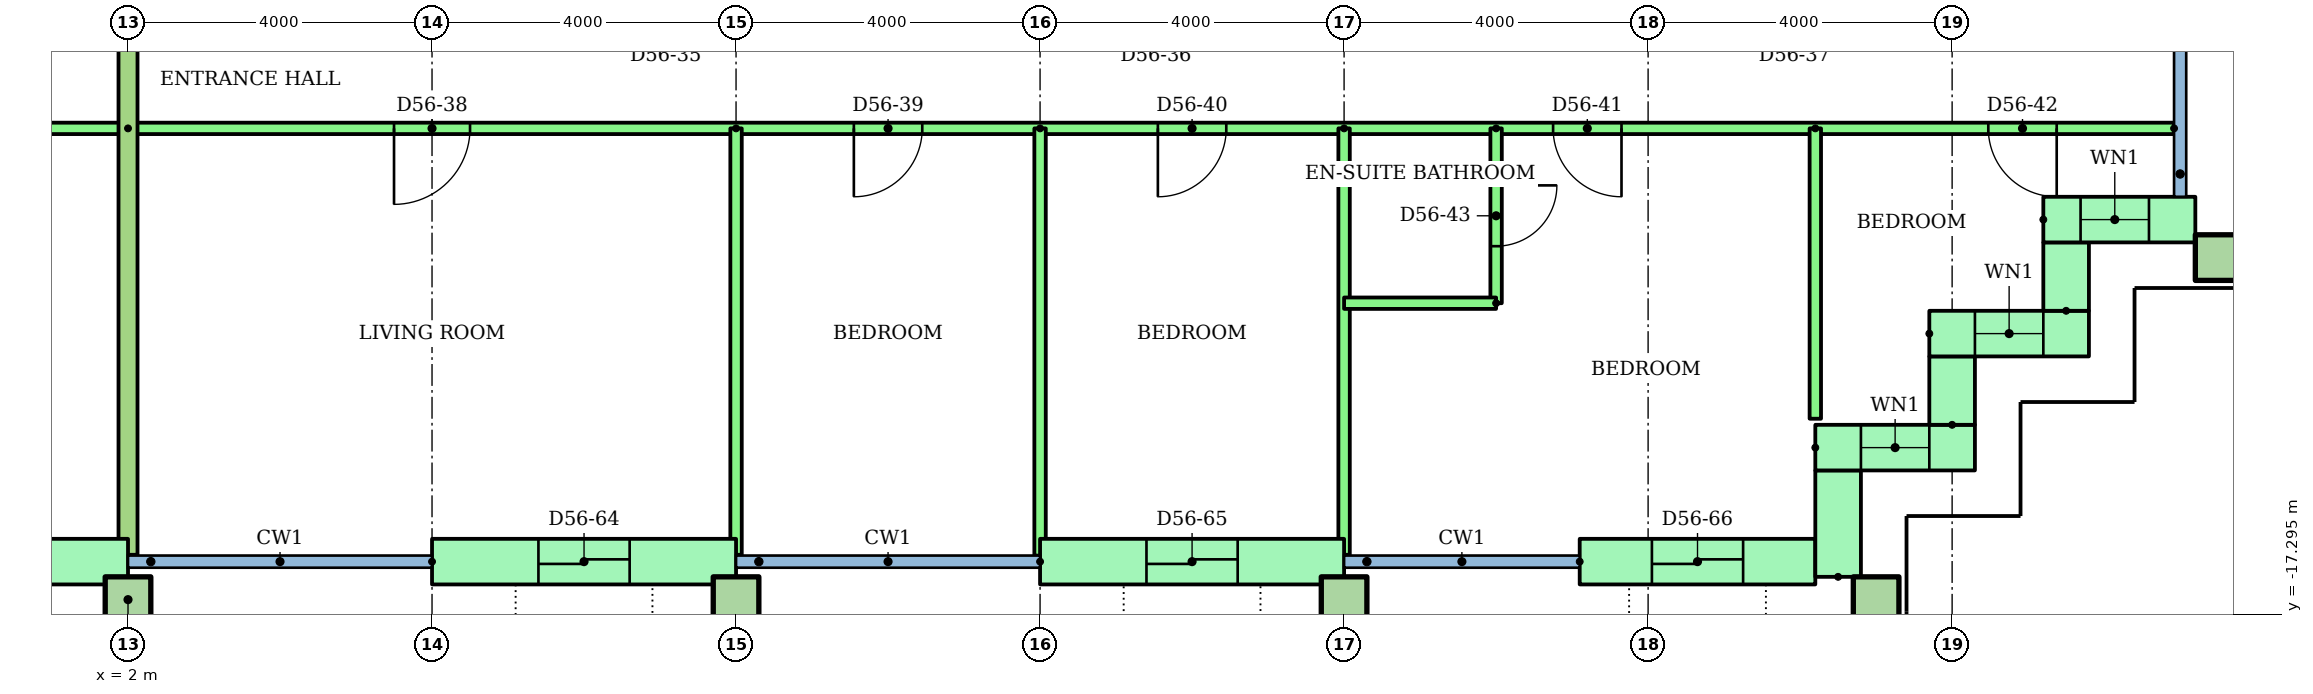
"""IFC4 building model, lengths in metres.
Left out: names, types, materials, properties, quantities, classifications, styles, units other than length and angle.
Written with IfcOpenShell. Run it as: python <this file> out.ifc"""

import sys

from ifc_helpers import new_model, si_unit, direction, frame, frame_2d, origin, origin_2d, place, context, subcontext, project, spatial, rectangle, hollow_rectangle, extrude, element, fill, save


model = new_model("IFC4")
c1 = context("Model", 3, precision=1e-05, world=origin(), true_north=direction((0.0, 1.0)))
c2 = subcontext(c1, "Body", "Model", "MODEL_VIEW")
j1 = project(units=[si_unit("LENGTHUNIT", "METRE"), si_unit("PLANEANGLEUNIT", "RADIAN")], contexts=[c1])
p1 = place(None, origin())
s1 = spatial("IfcSite", under=j1, at=p1, CompositionType="ELEMENT")
p2 = place(p1, origin())
s2 = spatial("IfcBuilding", under=s1, at=p2, CompositionType="ELEMENT")
p3 = place(p2, frame((0.0, 0.0, 217.2)))
s3 = spatial("IfcBuildingStorey", under=s2, at=p3, CompositionType="ELEMENT", Elevation=217.2)
for number, where in (
    (1, (2.0, -17.1, 0.0)),
    (2, (10.0, -17.1, 0.0)),
    (3, (18.0, -17.1, 0.0)),
    (4, (25.0, -17.1, 0.0)),
    (5, (29.5, -12.6, 0.0)),
):
    element("IfcColumn", number, at=place(p3, frame(where)), inside=s3, PredefinedType="COLUMN", context=c2, shape_type="SweptSolid", body=[
        extrude(hollow_rectangle(XDim=0.6, YDim=0.6, WallThickness=0.03, at=origin_2d()), origin(), (0.0, 0.0, 1.0), 3.2),
    ])
p4 = place(p3, frame((-2.0, -16.6, 0.0)))
e6 = element("IfcWall", 6, at=p4, inside=s3, PredefinedType="STANDARD", context=c2, shape_type="SweptSolid", body=[
    extrude(rectangle(XDim=4.0, YDim=0.6, at=frame_2d((2.0, 0.0))), origin(), (0.0, 0.0, 1.0), 2.92),
])
p5 = place(p4, frame((1.4, 0.0, 0.0)))
e7 = element("IfcOpeningElement", 7, at=p5, cuts=e6, PredefinedType="OPENING", context=c2, shape_type="SweptSolid", body=[
    extrude(rectangle(XDim=1.2, YDim=2.1, at=frame_2d((0.6, 1.05))), frame((0.0, 0.31, 0.0), z_axis=(0.0, -1.0, 0.0), x_axis=(1.0, 0.0, 0.0)), (0.0, 0.0, 1.0), 0.62),
])
p6 = place(p3, frame((6.0, -16.6, 0.0)))
e8 = element("IfcWall", 8, at=p6, inside=s3, PredefinedType="STANDARD", context=c2, shape_type="SweptSolid", body=[
    extrude(rectangle(XDim=4.0, YDim=0.6, at=frame_2d((2.0, 0.0))), origin(), (0.0, 0.0, 1.0), 2.92),
])
p7 = place(p6, frame((1.4, 0.0, 0.0)))
e9 = element("IfcOpeningElement", 9, at=p7, cuts=e8, PredefinedType="OPENING", context=c2, shape_type="SweptSolid", body=[
    extrude(rectangle(XDim=1.2, YDim=2.1, at=frame_2d((0.6, 1.05))), frame((0.0, 0.31, 0.0), z_axis=(0.0, -1.0, 0.0), x_axis=(1.0, 0.0, 0.0)), (0.0, 0.0, 1.0), 0.62),
])
p8 = place(p3, frame((14.0, -16.6, 0.0)))
e10 = element("IfcWall", 10, at=p8, inside=s3, PredefinedType="STANDARD", context=c2, shape_type="SweptSolid", body=[
    extrude(rectangle(XDim=4.0, YDim=0.6, at=frame_2d((2.0, 0.0))), origin(), (0.0, 0.0, 1.0), 2.92),
])
p9 = place(p8, frame((1.4, 0.0, 0.0)))
e11 = element("IfcOpeningElement", 11, at=p9, cuts=e10, PredefinedType="OPENING", context=c2, shape_type="SweptSolid", body=[
    extrude(rectangle(XDim=1.2, YDim=2.1, at=frame_2d((0.6, 1.05))), frame((0.0, 0.31, 0.0), z_axis=(0.0, -1.0, 0.0), x_axis=(1.0, 0.0, 0.0)), (0.0, 0.0, 1.0), 0.62),
])
p10 = place(p3, frame((21.1, -16.6, 0.0)))
e12 = element("IfcWall", 12, at=p10, inside=s3, PredefinedType="STANDARD", context=c2, shape_type="SweptSolid", body=[
    extrude(rectangle(XDim=3.1, YDim=0.6, at=frame_2d((1.55, 0.0))), origin(), (0.0, 0.0, 1.0), 2.92),
])
p11 = place(p10, frame((0.95, 0.0, 0.0)))
e13 = element("IfcOpeningElement", 13, at=p11, cuts=e12, PredefinedType="OPENING", context=c2, shape_type="SweptSolid", body=[
    extrude(rectangle(XDim=1.2, YDim=2.1, at=frame_2d((0.6, 1.05))), frame((0.0, 0.31, 0.0), z_axis=(0.0, -1.0, 0.0), x_axis=(1.0, 0.0, 0.0)), (0.0, 0.0, 1.0), 0.62),
])
p12 = place(p3, frame((24.5, -16.8, 0.0), z_axis=(0.0, 0.0, 1.0), x_axis=(0.0, 1.0, 0.0)))
e14 = element("IfcWall", 14, at=p12, inside=s3, PredefinedType="STANDARD", context=c2, shape_type="SweptSolid", body=[
    extrude(rectangle(XDim=1.4, YDim=0.6, at=frame_2d((0.7, 0.0))), origin(), (0.0, 0.0, 1.0), 2.92),
])
p13 = place(p3, frame((24.2, -15.1, 0.0)))
e15 = element("IfcWall", 15, at=p13, inside=s3, PredefinedType="STANDARD", context=c2, shape_type="SweptSolid", body=[
    extrude(rectangle(XDim=2.1, YDim=0.6, at=frame_2d((1.05, 0.0))), origin(), (0.0, 0.0, 1.0), 2.92),
])
p14 = place(p13, frame((0.6, 0.0, 0.9)))
e16 = element("IfcOpeningElement", 16, at=p14, cuts=e15, PredefinedType="OPENING", context=c2, shape_type="SweptSolid", body=[
    extrude(rectangle(XDim=0.9, YDim=1.5, at=frame_2d((0.45, 0.75))), frame((0.0, 0.31, 0.0), z_axis=(0.0, -1.0, 0.0), x_axis=(1.0, 0.0, 0.0)), (0.0, 0.0, 1.0), 0.62),
])
p15 = place(p3, frame((26.0, -14.8, 0.0), z_axis=(0.0, 0.0, 1.0), x_axis=(0.0, 1.0, 0.0)))
e17 = element("IfcWall", 17, at=p15, inside=s3, PredefinedType="STANDARD", context=c2, shape_type="SweptSolid", body=[
    extrude(rectangle(XDim=0.9, YDim=0.6, at=frame_2d((0.45, 0.0))), origin(), (0.0, 0.0, 1.0), 2.92),
])
p16 = place(p3, frame((25.7, -13.6, 0.0)))
e18 = element("IfcWall", 18, at=p16, inside=s3, PredefinedType="STANDARD", context=c2, shape_type="SweptSolid", body=[
    extrude(rectangle(XDim=2.1, YDim=0.6, at=frame_2d((1.05, 0.0))), origin(), (0.0, 0.0, 1.0), 2.92),
])
p17 = place(p16, frame((0.6, 0.0, 0.9)))
e19 = element("IfcOpeningElement", 19, at=p17, cuts=e18, PredefinedType="OPENING", context=c2, shape_type="SweptSolid", body=[
    extrude(rectangle(XDim=0.9, YDim=1.5, at=frame_2d((0.45, 0.75))), frame((0.0, 0.31, 0.0), z_axis=(0.0, -1.0, 0.0), x_axis=(1.0, 0.0, 0.0)), (0.0, 0.0, 1.0), 0.62),
])
p18 = place(p3, frame((27.5, -13.3, 0.0), z_axis=(0.0, 0.0, 1.0), x_axis=(0.0, 1.0, 0.0)))
e20 = element("IfcWall", 20, at=p18, inside=s3, PredefinedType="STANDARD", context=c2, shape_type="SweptSolid", body=[
    extrude(rectangle(XDim=0.9, YDim=0.6, at=frame_2d((0.45, 0.0))), origin(), (0.0, 0.0, 1.0), 2.92),
])
p19 = place(p3, frame((27.2, -12.1, 0.0)))
e21 = element("IfcWall", 21, at=p19, inside=s3, PredefinedType="STANDARD", context=c2, shape_type="SweptSolid", body=[
    extrude(rectangle(XDim=2.0, YDim=0.6, at=frame_2d((1.0, 0.0))), origin(), (0.0, 0.0, 1.0), 2.92),
])
p20 = place(p19, frame((0.49, 0.0, 0.9)))
e22 = element("IfcOpeningElement", 22, at=p20, cuts=e21, PredefinedType="OPENING", context=c2, shape_type="SweptSolid", body=[
    extrude(rectangle(XDim=0.9, YDim=1.5, at=frame_2d((0.45, 0.75))), frame((0.0, 0.31, 0.0), z_axis=(0.0, -1.0, 0.0), x_axis=(1.0, 0.0, 0.0)), (0.0, 0.0, 1.0), 0.62),
])
p21 = place(p3, frame((2.0, -10.9, 0.0), z_axis=(0.0, 0.0, 1.0), x_axis=(-1.0, 0.0, 0.0)))
e23 = element("IfcWall", 23, at=p21, inside=s3, PredefinedType="PARTITIONING", context=c2, shape_type="SweptSolid", body=[
    extrude(rectangle(XDim=8.0, YDim=0.15, at=frame_2d((4.0, 0.0))), origin(), (0.0, 0.0, 1.0), 2.4),
])
p22 = place(p21, frame((5.55, 0.0, 0.0)))
e24 = element("IfcOpeningElement", 24, at=p22, cuts=e23, PredefinedType="OPENING", context=c2, shape_type="SweptSolid", body=[
    extrude(rectangle(XDim=0.9, YDim=2.1, at=frame_2d((0.45, 1.05))), frame((0.0, 0.085, 0.0), z_axis=(0.0, -1.0, 0.0), x_axis=(1.0, 0.0, 0.0)), (0.0, 0.0, 1.0), 0.17),
])
p23 = place(p21, frame((1.5, 0.0, 0.0)))
e25 = element("IfcOpeningElement", 25, at=p23, cuts=e23, PredefinedType="OPENING", context=c2, shape_type="SweptSolid", body=[
    extrude(rectangle(XDim=1.0, YDim=2.1, at=frame_2d((0.5, 1.05))), frame((0.0, 0.085, 0.0), z_axis=(0.0, -1.0, 0.0), x_axis=(1.0, 0.0, 0.0)), (0.0, 0.0, 1.0), 0.17),
])
p24 = place(p3, frame((28.92, -10.9, 0.0), z_axis=(0.0, 0.0, 1.0), x_axis=(-1.0, 0.0, 0.0)))
e26 = element("IfcWall", 26, at=p24, inside=s3, PredefinedType="PARTITIONING", context=c2, shape_type="SweptSolid", body=[
    extrude(rectangle(XDim=26.92, YDim=0.15, at=frame_2d((13.46, 0.0))), origin(), (0.0, 0.0, 1.0), 2.4),
])
p25 = place(p24, frame((22.42, 0.0, 0.0)))
e27 = element("IfcOpeningElement", 27, at=p25, cuts=e26, PredefinedType="OPENING", context=c2, shape_type="SweptSolid", body=[
    extrude(rectangle(XDim=1.0, YDim=2.1, at=frame_2d((0.5, 1.05))), frame((0.0, 0.085, 0.0), z_axis=(0.0, -1.0, 0.0), x_axis=(1.0, 0.0, 0.0)), (0.0, 0.0, 1.0), 0.17),
])
p26 = place(p24, frame((16.47, 0.0, 0.0)))
e28 = element("IfcOpeningElement", 28, at=p26, cuts=e26, PredefinedType="OPENING", context=c2, shape_type="SweptSolid", body=[
    extrude(rectangle(XDim=0.9, YDim=2.1, at=frame_2d((0.45, 1.05))), frame((0.0, 0.085, 0.0), z_axis=(0.0, -1.0, 0.0), x_axis=(1.0, 0.0, 0.0)), (0.0, 0.0, 1.0), 0.17),
])
p27 = place(p24, frame((12.47, 0.0, 0.0)))
e29 = element("IfcOpeningElement", 29, at=p27, cuts=e26, PredefinedType="OPENING", context=c2, shape_type="SweptSolid", body=[
    extrude(rectangle(XDim=0.9, YDim=2.1, at=frame_2d((0.45, 1.05))), frame((0.0, 0.085, 0.0), z_axis=(0.0, -1.0, 0.0), x_axis=(1.0, 0.0, 0.0)), (0.0, 0.0, 1.0), 0.17),
])
p28 = place(p24, frame((7.27, 0.0, 0.0)))
e30 = element("IfcOpeningElement", 30, at=p28, cuts=e26, PredefinedType="OPENING", context=c2, shape_type="SweptSolid", body=[
    extrude(rectangle(XDim=0.9, YDim=2.1, at=frame_2d((0.45, 1.05))), frame((0.0, 0.085, 0.0), z_axis=(0.0, -1.0, 0.0), x_axis=(1.0, 0.0, 0.0)), (0.0, 0.0, 1.0), 0.17),
])
p29 = place(p24, frame((1.544, 0.0, 0.0)))
e31 = element("IfcOpeningElement", 31, at=p29, cuts=e26, PredefinedType="OPENING", context=c2, shape_type="SweptSolid", body=[
    extrude(rectangle(XDim=0.9, YDim=2.1, at=frame_2d((0.45, 1.05))), frame((0.0, 0.085, 0.0), z_axis=(0.0, -1.0, 0.0), x_axis=(1.0, 0.0, 0.0)), (0.0, 0.0, 1.0), 0.17),
])
p30 = place(p3, frame((10.0, -10.9, 0.0), z_axis=(0.0, 0.0, 1.0), x_axis=(0.0, -1.0, 0.0)))
e32 = element("IfcWall", 32, at=p30, inside=s3, PredefinedType="PARTITIONING", context=c2, shape_type="SweptSolid", body=[
    extrude(rectangle(XDim=5.61, YDim=0.15, at=frame_2d((2.805, 0.0))), origin(), (0.0, 0.0, 1.0), 2.4),
])
p31 = place(p3, frame((14.0, -10.9, 0.0), z_axis=(0.0, 0.0, 1.0), x_axis=(0.0, -1.0, 0.0)))
e33 = element("IfcWall", 33, at=p31, inside=s3, PredefinedType="PARTITIONING", context=c2, shape_type="SweptSolid", body=[
    extrude(rectangle(XDim=5.621, YDim=0.15, at=frame_2d((2.811, 0.0))), origin(), (0.0, 0.0, 1.0), 2.4),
])
p32 = place(p3, frame((18.0, -10.9, 0.0), z_axis=(0.0, 0.0, 1.0), x_axis=(0.0, -1.0, 0.0)))
e34 = element("IfcWall", 34, at=p32, inside=s3, PredefinedType="PARTITIONING", context=c2, shape_type="SweptSolid", body=[
    extrude(rectangle(XDim=5.61, YDim=0.15, at=frame_2d((2.805, 0.0))), origin(), (0.0, 0.0, 1.0), 2.4),
])
p33 = place(p3, frame((24.2, -10.9, 0.0), z_axis=(0.0, 0.0, 1.0), x_axis=(0.0, -1.0, 0.0)))
e35 = element("IfcWall", 35, at=p33, inside=s3, PredefinedType="PARTITIONING", context=c2, shape_type="SweptSolid", body=[
    extrude(rectangle(XDim=3.82, YDim=0.15, at=frame_2d((1.91, 0.0))), origin(), (0.0, 0.0, 1.0), 2.4),
])
p34 = place(p3, frame((20.0, -10.9, 0.0), z_axis=(0.0, 0.0, 1.0), x_axis=(0.0, -1.0, 0.0)))
e36 = element("IfcWall", 36, at=p34, inside=s3, PredefinedType="PARTITIONING", context=c2, shape_type="SweptSolid", body=[
    extrude(rectangle(XDim=2.3, YDim=0.15, at=frame_2d((1.15, 0.0))), origin(), (0.0, 0.0, 1.0), 2.4),
])
p35 = place(p34, frame((0.75, 0.0, 0.0)))
e37 = element("IfcOpeningElement", 37, at=p35, cuts=e36, PredefinedType="OPENING", context=c2, shape_type="SweptSolid", body=[
    extrude(rectangle(XDim=0.8, YDim=2.1, at=frame_2d((0.4, 1.05))), frame((0.0, 0.085, 0.0), z_axis=(0.0, -1.0, 0.0), x_axis=(1.0, 0.0, 0.0)), (0.0, 0.0, 1.0), 0.17),
])
p36 = place(p3, frame((20.0, -13.2, 0.0), z_axis=(0.0, 0.0, 1.0), x_axis=(-1.0, 0.0, 0.0)))
e38 = element("IfcWall", 38, at=p36, inside=s3, PredefinedType="PARTITIONING", context=c2, shape_type="SweptSolid", body=[
    extrude(rectangle(XDim=2.0, YDim=0.15, at=frame_2d((1.0, 0.0))), origin(), (0.0, 0.0, 1.0), 2.4),
])
p37 = place(p3, frame((2.0, -1.4, 0.0), z_axis=(0.0, 0.0, 1.0), x_axis=(0.0, -1.0, 0.0)))
e39 = element("IfcWall", 39, at=p37, inside=s3, PredefinedType="PARTITIONING", context=c2, shape_type="SweptSolid", body=[
    extrude(rectangle(XDim=15.11, YDim=0.25, at=frame_2d((7.555, 0.0))), origin(), (0.0, 0.0, 1.0), 2.4),
])
p38 = place(p14, origin())
e40 = element("IfcWindow", 40, at=p38, inside=s3, PartitioningType="SINGLE_PANEL", PredefinedType="WINDOW", context=c2, shape_type="SweptSolid", body=[
    extrude(rectangle(XDim=0.9, YDim=1.5, at=frame_2d((0.45, 0.75))), frame((0.0, 0.03, 0.0), z_axis=(0.0, -1.0, 0.0), x_axis=(1.0, 0.0, 0.0)), (0.0, 0.0, 1.0), 0.06),
])
fill(e16, e40)
p39 = place(p17, origin())
e41 = element("IfcWindow", 41, at=p39, inside=s3, PartitioningType="SINGLE_PANEL", PredefinedType="WINDOW", context=c2, shape_type="SweptSolid", body=[
    extrude(rectangle(XDim=0.9, YDim=1.5, at=frame_2d((0.45, 0.75))), frame((0.0, 0.03, 0.0), z_axis=(0.0, -1.0, 0.0), x_axis=(1.0, 0.0, 0.0)), (0.0, 0.0, 1.0), 0.06),
])
fill(e19, e41)
p40 = place(p20, origin())
e42 = element("IfcWindow", 42, at=p40, inside=s3, PartitioningType="SINGLE_PANEL", PredefinedType="WINDOW", context=c2, shape_type="SweptSolid", body=[
    extrude(rectangle(XDim=0.9, YDim=1.5, at=frame_2d((0.45, 0.75))), frame((0.0, 0.03, 0.0), z_axis=(0.0, -1.0, 0.0), x_axis=(1.0, 0.0, 0.0)), (0.0, 0.0, 1.0), 0.06),
])
fill(e22, e42)
p41 = place(p25, origin())
e43 = element("IfcDoor", 43, at=p41, inside=s3, OperationType="SINGLE_SWING_RIGHT", PredefinedType="DOOR", context=c2, shape_type="SweptSolid", body=[
    extrude(rectangle(XDim=1.0, YDim=2.1, at=frame_2d((0.5, 1.05))), frame((0.0, 0.025, 0.0), z_axis=(0.0, -1.0, 0.0), x_axis=(1.0, 0.0, 0.0)), (0.0, 0.0, 1.0), 0.05),
])
fill(e27, e43)
p42 = place(p26, origin())
e44 = element("IfcDoor", 44, at=p42, inside=s3, OperationType="SINGLE_SWING_RIGHT", PredefinedType="DOOR", context=c2, shape_type="SweptSolid", body=[
    extrude(rectangle(XDim=0.9, YDim=2.1, at=frame_2d((0.45, 1.05))), frame((0.0, 0.025, 0.0), z_axis=(0.0, -1.0, 0.0), x_axis=(1.0, 0.0, 0.0)), (0.0, 0.0, 1.0), 0.05),
])
fill(e28, e44)
p43 = place(p27, origin())
e45 = element("IfcDoor", 45, at=p43, inside=s3, OperationType="SINGLE_SWING_RIGHT", PredefinedType="DOOR", context=c2, shape_type="SweptSolid", body=[
    extrude(rectangle(XDim=0.9, YDim=2.1, at=frame_2d((0.45, 1.05))), frame((0.0, 0.025, 0.0), z_axis=(0.0, -1.0, 0.0), x_axis=(1.0, 0.0, 0.0)), (0.0, 0.0, 1.0), 0.05),
])
fill(e29, e45)
p44 = place(p28, origin())
e46 = element("IfcDoor", 46, at=p44, inside=s3, OperationType="SINGLE_SWING_LEFT", PredefinedType="DOOR", context=c2, shape_type="SweptSolid", body=[
    extrude(rectangle(XDim=0.9, YDim=2.1, at=frame_2d((0.45, 1.05))), frame((0.0, 0.025, 0.0), z_axis=(0.0, -1.0, 0.0), x_axis=(1.0, 0.0, 0.0)), (0.0, 0.0, 1.0), 0.05),
])
fill(e30, e46)
p45 = place(p29, origin())
e47 = element("IfcDoor", 47, at=p45, inside=s3, OperationType="SINGLE_SWING_LEFT", PredefinedType="DOOR", context=c2, shape_type="SweptSolid", body=[
    extrude(rectangle(XDim=0.9, YDim=2.1, at=frame_2d((0.45, 1.05))), frame((0.0, 0.025, 0.0), z_axis=(0.0, -1.0, 0.0), x_axis=(1.0, 0.0, 0.0)), (0.0, 0.0, 1.0), 0.05),
])
fill(e31, e47)
p46 = place(p35, origin())
e48 = element("IfcDoor", 48, at=p46, inside=s3, OperationType="SINGLE_SWING_LEFT", PredefinedType="DOOR", context=c2, shape_type="SweptSolid", body=[
    extrude(rectangle(XDim=0.8, YDim=2.1, at=frame_2d((0.4, 1.05))), frame((0.0, 0.025, 0.0), z_axis=(0.0, -1.0, 0.0), x_axis=(1.0, 0.0, 0.0)), (0.0, 0.0, 1.0), 0.05),
])
fill(e37, e48)
p47 = place(p7, origin())
e49 = element("IfcDoor", 49, at=p47, inside=s3, OperationType="SLIDING_TO_LEFT", PredefinedType="DOOR", context=c2, shape_type="SweptSolid", body=[
    extrude(rectangle(XDim=1.2, YDim=2.1, at=frame_2d((0.6, 1.05))), frame((0.0, 0.025, 0.0), z_axis=(0.0, -1.0, 0.0), x_axis=(1.0, 0.0, 0.0)), (0.0, 0.0, 1.0), 0.05),
])
fill(e9, e49)
p48 = place(p9, origin())
e50 = element("IfcDoor", 50, at=p48, inside=s3, OperationType="SLIDING_TO_LEFT", PredefinedType="DOOR", context=c2, shape_type="SweptSolid", body=[
    extrude(rectangle(XDim=1.2, YDim=2.1, at=frame_2d((0.6, 1.05))), frame((0.0, 0.025, 0.0), z_axis=(0.0, -1.0, 0.0), x_axis=(1.0, 0.0, 0.0)), (0.0, 0.0, 1.0), 0.05),
])
fill(e11, e50)
p49 = place(p11, origin())
e51 = element("IfcDoor", 51, at=p49, inside=s3, OperationType="SLIDING_TO_LEFT", PredefinedType="DOOR", context=c2, shape_type="SweptSolid", body=[
    extrude(rectangle(XDim=1.2, YDim=2.1, at=frame_2d((0.6, 1.05))), frame((0.0, 0.025, 0.0), z_axis=(0.0, -1.0, 0.0), x_axis=(1.0, 0.0, 0.0)), (0.0, 0.0, 1.0), 0.05),
])
fill(e13, e51)
save(model, sys.argv[1])
